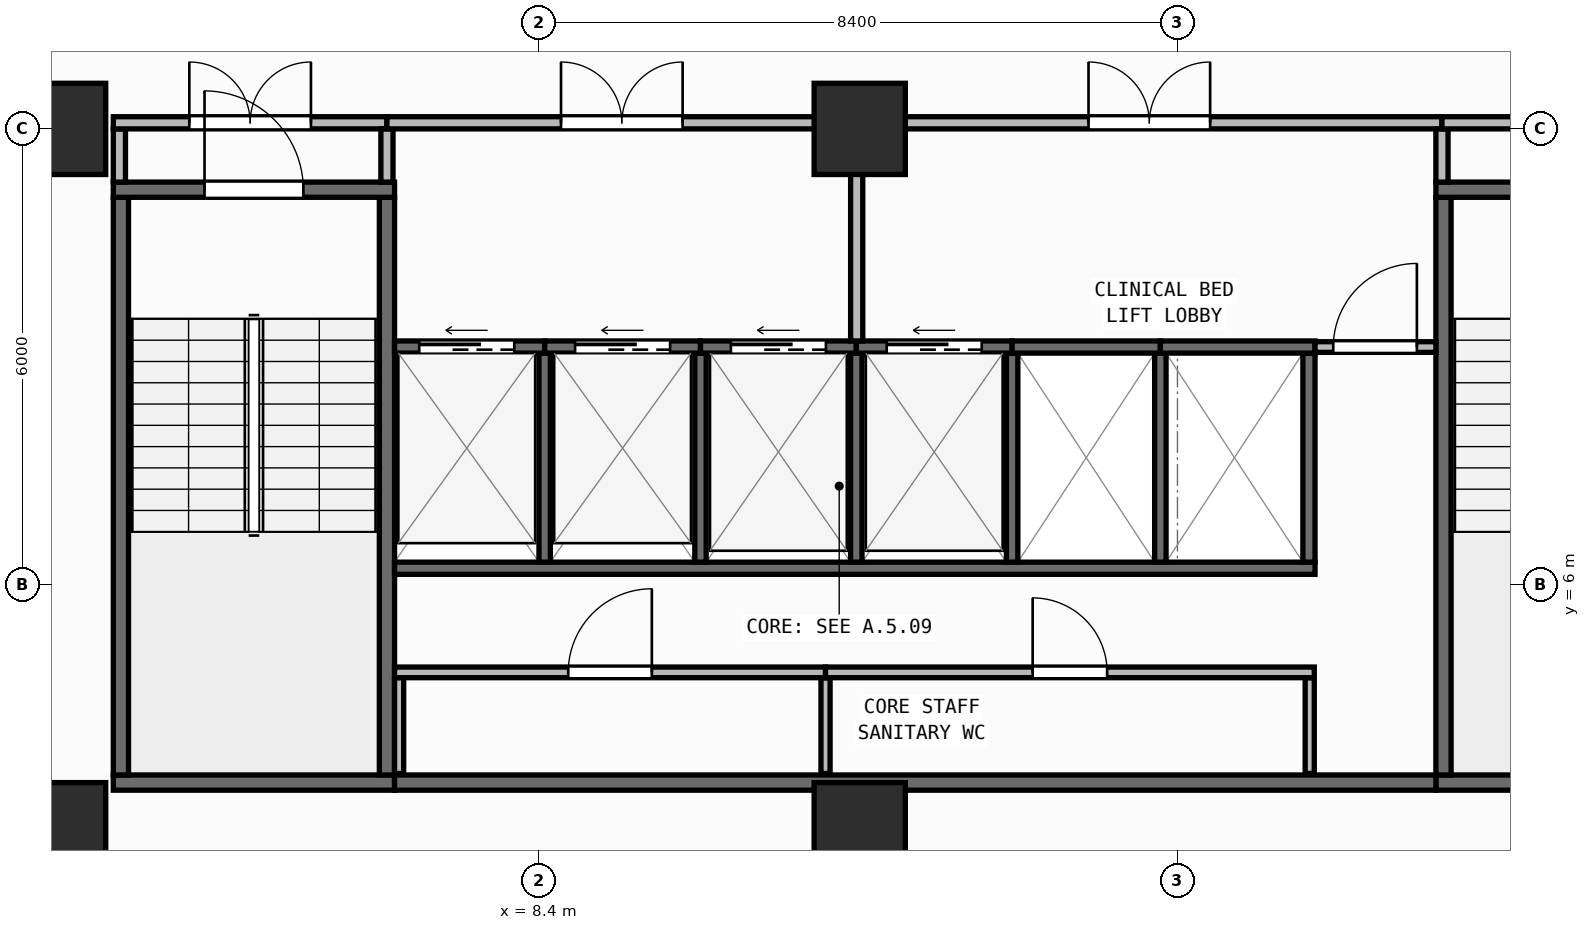
"""IFC4 building model, lengths in metres.
Left out: names, types, materials, properties, quantities, classifications, styles, units other than length and angle.
Written with IfcOpenShell. Run it as: python <this file> out.ifc"""

import sys

from ifc_helpers import new_model, si_unit, direction, frame, frame_2d, origin, origin_2d, place, context, subcontext, project, spatial, rectangle, extrude, element, fill, save


model = new_model("IFC4")
c1 = context("Model", 3, precision=1e-05, world=origin(), true_north=direction((0.0, 1.0)))
c2 = subcontext(c1, "Body", "Model", "MODEL_VIEW")
j1 = project(units=[si_unit("LENGTHUNIT", "METRE"), si_unit("PLANEANGLEUNIT", "RADIAN")], contexts=[c1])
p1 = place(None, origin())
s1 = spatial("IfcSite", under=j1, at=p1, CompositionType="ELEMENT")
p2 = place(p1, origin())
s2 = spatial("IfcBuilding", under=s1, at=p2, CompositionType="ELEMENT")
p3 = place(p2, frame((0.0, 0.0, 119.15)))
s3 = spatial("IfcBuildingStorey", under=s2, at=p3, CompositionType="ELEMENT", Elevation=119.15)
for number, where, z_axis, x_axis in (
    (1, (2.1, 2.8, 0.0), (0.0, 0.0, 1.0), (1.0, 0.0, 0.0)),
    (2, (12.62, 2.8, 0.0), (0.0, 0.0, 1.0), (1.0, 0.0, 0.0)),
    (3, (2.1, 12.0, 0.0), (0.0, 0.0, 1.0), (1.0, 0.0, 0.0)),
    (4, (12.62, 12.0, 0.0), (0.0, 0.0, 1.0), (1.0, 0.0, 0.0)),
):
    element("IfcColumn", number, at=place(p3, frame(where, z_axis=z_axis, x_axis=x_axis)), inside=s3, PredefinedType="COLUMN", context=c2, shape_type="SweptSolid", body=[
        extrude(rectangle(XDim=1.2, YDim=1.2, at=origin_2d()), origin(), (0.0, 0.0, 1.0), 3.95),
    ])
p4 = place(p3, frame((2.76, 0.173, 0.0), z_axis=(0.0, 0.0, 1.0), x_axis=(0.996857931723, 0.079210251617, 0.0)))
e5 = element("IfcWall", 5, at=p4, inside=s3, PredefinedType="STANDARD", context=c2, shape_type="SweptSolid", body=[
    extrude(rectangle(XDim=51.442, YDim=0.26, at=frame_2d((25.721, 0.0))), origin(), (0.0, 0.0, 1.0), 3.71),
])
p5 = place(p4, frame((24.521, 0.0, 0.9)))
e6 = element("IfcOpeningElement", 6, at=p5, cuts=e5, PredefinedType="OPENING", context=c2, shape_type="SweptSolid", body=[
    extrude(rectangle(XDim=2.4, YDim=1.65, at=frame_2d((1.2, 0.825))), frame((0.0, 0.14, 0.0), z_axis=(0.0, -1.0, 0.0), x_axis=(1.0, 0.0, 0.0)), (0.0, 0.0, 1.0), 0.28),
])
p6 = place(p3, frame((2.8, 3.4, 0.0), z_axis=(0.0, 0.0, 1.0), x_axis=(1.0, 0.0, 0.0)))
e7 = element("IfcWall", 7, at=p6, inside=s3, PredefinedType="SHEAR", context=c2, shape_type="SweptSolid", body=[
    extrude(rectangle(XDim=3.7, YDim=0.2, at=frame_2d((1.85, 0.0))), origin(), (0.0, 0.0, 1.0), 3.71),
])
for number, where, z_axis, x_axis in (
    (8, (2.9, 3.5, 0.0), (0.0, 0.0, 1.0), (0.0, 1.0, 0.0)),
    (9, (6.4, 3.5, 0.0), (0.0, 0.0, 1.0), (0.0, 1.0, 0.0)),
):
    element("IfcWall", number, at=place(p3, frame(where, z_axis=z_axis, x_axis=x_axis)), inside=s3, PredefinedType="SHEAR", context=c2, shape_type="SweptSolid", body=[
        extrude(rectangle(XDim=7.6, YDim=0.2, at=frame_2d((3.8, 0.0))), origin(), (0.0, 0.0, 1.0), 3.71),
    ])
p7 = place(p3, frame((2.8, 11.2, 0.0), z_axis=(0.0, 0.0, 1.0), x_axis=(1.0, 0.0, 0.0)))
e10 = element("IfcWall", 10, at=p7, inside=s3, PredefinedType="SHEAR", context=c2, shape_type="SweptSolid", body=[
    extrude(rectangle(XDim=3.7, YDim=0.2, at=frame_2d((1.85, 0.0))), origin(), (0.0, 0.0, 1.0), 3.71),
])
p8 = place(p7, frame((1.2, 0.0, 0.0)))
e11 = element("IfcOpeningElement", 11, at=p8, cuts=e10, PredefinedType="OPENING", context=c2, shape_type="SweptSolid", body=[
    extrude(rectangle(XDim=1.3, YDim=2.15, at=frame_2d((0.65, 1.075))), frame((0.0, 0.11, 0.0), z_axis=(0.0, -1.0, 0.0), x_axis=(1.0, 0.0, 0.0)), (0.0, 0.0, 1.0), 0.22),
])
p9 = place(p3, frame((20.2, 3.4, 0.0), z_axis=(0.0, 0.0, 1.0), x_axis=(1.0, 0.0, 0.0)))
e12 = element("IfcWall", 12, at=p9, inside=s3, PredefinedType="SHEAR", context=c2, shape_type="SweptSolid", body=[
    extrude(rectangle(XDim=3.7, YDim=0.2, at=frame_2d((1.85, 0.0))), origin(), (0.0, 0.0, 1.0), 3.71),
])
p10 = place(p3, frame((20.3, 3.5, 0.0), z_axis=(0.0, 0.0, 1.0), x_axis=(0.0, 1.0, 0.0)))
e13 = element("IfcWall", 13, at=p10, inside=s3, PredefinedType="SHEAR", context=c2, shape_type="SweptSolid", body=[
    extrude(rectangle(XDim=7.6, YDim=0.2, at=frame_2d((3.8, 0.0))), origin(), (0.0, 0.0, 1.0), 3.71),
])
p11 = place(p3, frame((20.2, 11.2, 0.0), z_axis=(0.0, 0.0, 1.0), x_axis=(1.0, 0.0, 0.0)))
e14 = element("IfcWall", 14, at=p11, inside=s3, PredefinedType="SHEAR", context=c2, shape_type="SweptSolid", body=[
    extrude(rectangle(XDim=3.7, YDim=0.2, at=frame_2d((1.85, 0.0))), origin(), (0.0, 0.0, 1.0), 3.71),
])
p12 = place(p11, frame((1.2, 0.0, 0.0)))
e15 = element("IfcOpeningElement", 15, at=p12, cuts=e14, PredefinedType="OPENING", context=c2, shape_type="SweptSolid", body=[
    extrude(rectangle(XDim=1.3, YDim=2.15, at=frame_2d((0.65, 1.075))), frame((0.0, 0.11, 0.0), z_axis=(0.0, -1.0, 0.0), x_axis=(1.0, 0.0, 0.0)), (0.0, 0.0, 1.0), 0.22),
])
p13 = place(p3, frame((6.5, 3.4, 0.0), z_axis=(0.0, 0.0, 1.0), x_axis=(1.0, 0.0, 0.0)))
e16 = element("IfcWall", 16, at=p13, inside=s3, PredefinedType="SHEAR", context=c2, shape_type="SweptSolid", body=[
    extrude(rectangle(XDim=13.7, YDim=0.2, at=frame_2d((6.85, 0.0))), origin(), (0.0, 0.0, 1.0), 3.71),
])
p14 = place(p3, frame((6.5, 6.22, 0.0), z_axis=(0.0, 0.0, 1.0), x_axis=(1.0, 0.0, 0.0)))
e17 = element("IfcWall", 17, at=p14, inside=s3, PredefinedType="SHEAR", context=c2, shape_type="SweptSolid", body=[
    extrude(rectangle(XDim=12.11, YDim=0.16, at=frame_2d((6.055, 0.0))), origin(), (0.0, 0.0, 1.0), 3.71),
])
p15 = place(p3, frame((18.53, 6.3, 0.0), z_axis=(0.0, 0.0, 1.0), x_axis=(0.0, 1.0, 0.0)))
e18 = element("IfcWall", 18, at=p15, inside=s3, PredefinedType="SHEAR", context=c2, shape_type="SweptSolid", body=[
    extrude(rectangle(XDim=2.75, YDim=0.16, at=frame_2d((1.375, 0.0))), origin(), (0.0, 0.0, 1.0), 3.71),
])
for number, where, z_axis, x_axis in (
    (19, (8.475, 6.3, 0.0), (0.0, 0.0, 1.0), (0.0, 1.0, 0.0)),
    (20, (10.525, 6.3, 0.0), (0.0, 0.0, 1.0), (0.0, 1.0, 0.0)),
    (21, (12.575, 6.3, 0.0), (0.0, 0.0, 1.0), (0.0, 1.0, 0.0)),
    (22, (14.625, 6.3, 0.0), (0.0, 0.0, 1.0), (0.0, 1.0, 0.0)),
    (23, (16.575, 6.3, 0.0), (0.0, 0.0, 1.0), (0.0, 1.0, 0.0)),
):
    element("IfcWall", number, at=place(p3, frame(where, z_axis=z_axis, x_axis=x_axis)), inside=s3, PredefinedType="SHEAR", context=c2, shape_type="SweptSolid", body=[
        extrude(rectangle(XDim=2.75, YDim=0.15, at=frame_2d((1.375, 0.0))), origin(), (0.0, 0.0, 1.0), 3.71),
    ])
p16 = place(p3, frame((6.5, 9.13, 0.0), z_axis=(0.0, 0.0, 1.0), x_axis=(1.0, 0.0, 0.0)))
e24 = element("IfcWall", 24, at=p16, inside=s3, PredefinedType="SHEAR", context=c2, shape_type="SweptSolid", body=[
    extrude(rectangle(XDim=1.975, YDim=0.16, at=frame_2d((0.988, 0.0))), origin(), (0.0, 0.0, 1.0), 3.71),
])
p17 = place(p16, frame((0.325, 0.0, 0.0)))
e25 = element("IfcOpeningElement", 25, at=p17, cuts=e24, PredefinedType="OPENING", context=c2, shape_type="SweptSolid", body=[
    extrude(rectangle(XDim=1.25, YDim=2.15, at=frame_2d((0.625, 1.075))), frame((0.0, 0.09, 0.0), z_axis=(0.0, -1.0, 0.0), x_axis=(1.0, 0.0, 0.0)), (0.0, 0.0, 1.0), 0.18),
])
p18 = place(p3, frame((8.475, 9.13, 0.0), z_axis=(0.0, 0.0, 1.0), x_axis=(1.0, 0.0, 0.0)))
e26 = element("IfcWall", 26, at=p18, inside=s3, PredefinedType="SHEAR", context=c2, shape_type="SweptSolid", body=[
    extrude(rectangle(XDim=2.05, YDim=0.16, at=frame_2d((1.025, 0.0))), origin(), (0.0, 0.0, 1.0), 3.71),
])
p19 = place(p18, frame((0.4, 0.0, 0.0)))
e27 = element("IfcOpeningElement", 27, at=p19, cuts=e26, PredefinedType="OPENING", context=c2, shape_type="SweptSolid", body=[
    extrude(rectangle(XDim=1.25, YDim=2.15, at=frame_2d((0.625, 1.075))), frame((0.0, 0.09, 0.0), z_axis=(0.0, -1.0, 0.0), x_axis=(1.0, 0.0, 0.0)), (0.0, 0.0, 1.0), 0.18),
])
p20 = place(p3, frame((10.525, 9.13, 0.0), z_axis=(0.0, 0.0, 1.0), x_axis=(1.0, 0.0, 0.0)))
e28 = element("IfcWall", 28, at=p20, inside=s3, PredefinedType="SHEAR", context=c2, shape_type="SweptSolid", body=[
    extrude(rectangle(XDim=2.05, YDim=0.16, at=frame_2d((1.025, 0.0))), origin(), (0.0, 0.0, 1.0), 3.71),
])
p21 = place(p20, frame((0.4, 0.0, 0.0)))
e29 = element("IfcOpeningElement", 29, at=p21, cuts=e28, PredefinedType="OPENING", context=c2, shape_type="SweptSolid", body=[
    extrude(rectangle(XDim=1.25, YDim=2.15, at=frame_2d((0.625, 1.075))), frame((0.0, 0.09, 0.0), z_axis=(0.0, -1.0, 0.0), x_axis=(1.0, 0.0, 0.0)), (0.0, 0.0, 1.0), 0.18),
])
p22 = place(p3, frame((12.575, 9.13, 0.0), z_axis=(0.0, 0.0, 1.0), x_axis=(1.0, 0.0, 0.0)))
e30 = element("IfcWall", 30, at=p22, inside=s3, PredefinedType="SHEAR", context=c2, shape_type="SweptSolid", body=[
    extrude(rectangle(XDim=2.05, YDim=0.16, at=frame_2d((1.025, 0.0))), origin(), (0.0, 0.0, 1.0), 3.71),
])
p23 = place(p22, frame((0.4, 0.0, 0.0)))
e31 = element("IfcOpeningElement", 31, at=p23, cuts=e30, PredefinedType="OPENING", context=c2, shape_type="SweptSolid", body=[
    extrude(rectangle(XDim=1.25, YDim=2.15, at=frame_2d((0.625, 1.075))), frame((0.0, 0.09, 0.0), z_axis=(0.0, -1.0, 0.0), x_axis=(1.0, 0.0, 0.0)), (0.0, 0.0, 1.0), 0.18),
])
p24 = place(p3, frame((14.625, 9.13, 0.0), z_axis=(0.0, 0.0, 1.0), x_axis=(1.0, 0.0, 0.0)))
e32 = element("IfcWall", 32, at=p24, inside=s3, PredefinedType="SHEAR", context=c2, shape_type="SweptSolid", body=[
    extrude(rectangle(XDim=1.95, YDim=0.16, at=frame_2d((0.975, 0.0))), origin(), (0.0, 0.0, 1.0), 3.71),
])
p25 = place(p3, frame((16.575, 9.13, 0.0), z_axis=(0.0, 0.0, 1.0), x_axis=(1.0, 0.0, 0.0)))
e33 = element("IfcWall", 33, at=p25, inside=s3, PredefinedType="SHEAR", context=c2, shape_type="SweptSolid", body=[
    extrude(rectangle(XDim=2.035, YDim=0.16, at=frame_2d((1.018, 0.0))), origin(), (0.0, 0.0, 1.0), 3.71),
])
for number, where, z_axis, x_axis in (
    (34, (6.56, 3.52, 0.0), (0.0, 0.0, 1.0), (0.0, 1.0, 0.0)),
    (35, (12.17, 3.52, 0.0), (0.0, 0.0, 1.0), (0.0, 1.0, 0.0)),
    (36, (18.54, 3.52, 0.0), (0.0, 0.0, 1.0), (0.0, 1.0, 0.0)),
):
    element("IfcWall", number, at=place(p3, frame(where, z_axis=z_axis, x_axis=x_axis)), inside=s3, PredefinedType="PARTITIONING", context=c2, shape_type="SweptSolid", body=[
        extrude(rectangle(XDim=1.26, YDim=0.12, at=frame_2d((0.63, 0.0))), origin(), (0.0, 0.0, 1.0), 3.71),
    ])
p26 = place(p3, frame((6.5, 4.85, 0.0), z_axis=(0.0, 0.0, 1.0), x_axis=(1.0, 0.0, 0.0)))
e37 = element("IfcWall", 37, at=p26, inside=s3, PredefinedType="PARTITIONING", context=c2, shape_type="SweptSolid", body=[
    extrude(rectangle(XDim=5.67, YDim=0.14, at=frame_2d((2.835, 0.0))), origin(), (0.0, 0.0, 1.0), 3.71),
])
p27 = place(p26, frame((2.285, 0.0, 0.0)))
e38 = element("IfcOpeningElement", 38, at=p27, cuts=e37, PredefinedType="OPENING", context=c2, shape_type="SweptSolid", body=[
    extrude(rectangle(XDim=1.1, YDim=2.1, at=frame_2d((0.55, 1.05))), frame((0.0, 0.08, 0.0), z_axis=(0.0, -1.0, 0.0), x_axis=(1.0, 0.0, 0.0)), (0.0, 0.0, 1.0), 0.16),
])
p28 = place(p3, frame((12.17, 4.85, 0.0), z_axis=(0.0, 0.0, 1.0), x_axis=(1.0, 0.0, 0.0)))
e39 = element("IfcWall", 39, at=p28, inside=s3, PredefinedType="PARTITIONING", context=c2, shape_type="SweptSolid", body=[
    extrude(rectangle(XDim=6.43, YDim=0.14, at=frame_2d((3.215, 0.0))), origin(), (0.0, 0.0, 1.0), 3.71),
])
p29 = place(p28, frame((2.725, 0.0, 0.0)))
e40 = element("IfcOpeningElement", 40, at=p29, cuts=e39, PredefinedType="OPENING", context=c2, shape_type="SweptSolid", body=[
    extrude(rectangle(XDim=0.98, YDim=2.1, at=frame_2d((0.49, 1.05))), frame((0.0, 0.08, 0.0), z_axis=(0.0, -1.0, 0.0), x_axis=(1.0, 0.0, 0.0)), (0.0, 0.0, 1.0), 0.16),
])
p30 = place(p3, frame((18.61, 9.13, 0.0), z_axis=(0.0, 0.0, 1.0), x_axis=(1.0, 0.0, 0.0)))
e41 = element("IfcWall", 41, at=p30, inside=s3, PredefinedType="PARTITIONING", context=c2, shape_type="SweptSolid", body=[
    extrude(rectangle(XDim=1.59, YDim=0.14, at=frame_2d((0.795, 0.0))), origin(), (0.0, 0.0, 1.0), 3.71),
])
p31 = place(p30, frame((0.24, 0.0, 0.0)))
e42 = element("IfcOpeningElement", 42, at=p31, cuts=e41, PredefinedType="OPENING", context=c2, shape_type="SweptSolid", body=[
    extrude(rectangle(XDim=1.1, YDim=2.1, at=frame_2d((0.55, 1.05))), frame((0.0, 0.08, 0.0), z_axis=(0.0, -1.0, 0.0), x_axis=(1.0, 0.0, 0.0)), (0.0, 0.0, 1.0), 0.16),
])
p32 = place(p3, frame((2.88, 11.3, 0.0), z_axis=(0.0, 0.0, 1.0), x_axis=(0.0, 1.0, 0.0)))
e43 = element("IfcWall", 43, at=p32, inside=s3, PredefinedType="PARTITIONING", context=c2, shape_type="SweptSolid", body=[
    extrude(rectangle(XDim=0.7, YDim=0.16, at=frame_2d((0.35, 0.0))), origin(), (0.0, 0.0, 1.0), 3.71),
])
p33 = place(p3, frame((2.8, 12.08, 0.0), z_axis=(0.0, 0.0, 1.0), x_axis=(1.0, 0.0, 0.0)))
e44 = element("IfcWall", 44, at=p33, inside=s3, PredefinedType="PARTITIONING", context=c2, shape_type="SweptSolid", body=[
    extrude(rectangle(XDim=3.6, YDim=0.16, at=frame_2d((1.8, 0.0))), origin(), (0.0, 0.0, 1.0), 3.083),
])
p34 = place(p33, frame((1.0, 0.0, 0.0)))
e45 = element("IfcOpeningElement", 45, at=p34, cuts=e44, PredefinedType="OPENING", context=c2, shape_type="SweptSolid", body=[
    extrude(rectangle(XDim=1.6, YDim=2.05, at=frame_2d((0.8, 1.025))), frame((0.0, 0.09, 0.0), z_axis=(0.0, -1.0, 0.0), x_axis=(1.0, 0.0, 0.0)), (0.0, 0.0, 1.0), 0.18),
])
p35 = place(p3, frame((6.4, 11.3, 0.0), z_axis=(0.0, 0.0, 1.0), x_axis=(0.0, 1.0, 0.0)))
e46 = element("IfcWall", 46, at=p35, inside=s3, PredefinedType="PARTITIONING", context=c2, shape_type="SweptSolid", body=[
    extrude(rectangle(XDim=0.7, YDim=0.16, at=frame_2d((0.35, 0.0))), origin(), (0.0, 0.0, 1.0), 3.71),
])
p36 = place(p3, frame((6.4, 12.08, 0.0), z_axis=(0.0, 0.0, 1.0), x_axis=(1.0, 0.0, 0.0)))
e47 = element("IfcWall", 47, at=p36, inside=s3, PredefinedType="PARTITIONING", context=c2, shape_type="SweptSolid", body=[
    extrude(rectangle(XDim=6.18, YDim=0.16, at=frame_2d((3.09, 0.0))), origin(), (0.0, 0.0, 1.0), 3.083),
])
p37 = place(p36, frame((2.29, 0.0, 0.0)))
e48 = element("IfcOpeningElement", 48, at=p37, cuts=e47, PredefinedType="OPENING", context=c2, shape_type="SweptSolid", body=[
    extrude(rectangle(XDim=1.6, YDim=2.05, at=frame_2d((0.8, 1.025))), frame((0.0, 0.09, 0.0), z_axis=(0.0, -1.0, 0.0), x_axis=(1.0, 0.0, 0.0)), (0.0, 0.0, 1.0), 0.18),
])
p38 = place(p3, frame((12.58, 9.21, 0.0), z_axis=(0.0, 0.0, 1.0), x_axis=(0.0, 1.0, 0.0)))
e49 = element("IfcWall", 49, at=p38, inside=s3, PredefinedType="PARTITIONING", context=c2, shape_type="SweptSolid", body=[
    extrude(rectangle(XDim=2.79, YDim=0.16, at=frame_2d((1.395, 0.0))), origin(), (0.0, 0.0, 1.0), 3.71),
])
p39 = place(p3, frame((12.58, 12.08, 0.0), z_axis=(0.0, 0.0, 1.0), x_axis=(1.0, 0.0, 0.0)))
e50 = element("IfcWall", 50, at=p39, inside=s3, PredefinedType="PARTITIONING", context=c2, shape_type="SweptSolid", body=[
    extrude(rectangle(XDim=7.7, YDim=0.16, at=frame_2d((3.85, 0.0))), origin(), (0.0, 0.0, 1.0), 3.083),
])
p40 = place(p39, frame((3.05, 0.0, 0.0)))
e51 = element("IfcOpeningElement", 51, at=p40, cuts=e50, PredefinedType="OPENING", context=c2, shape_type="SweptSolid", body=[
    extrude(rectangle(XDim=1.6, YDim=2.05, at=frame_2d((0.8, 1.025))), frame((0.0, 0.09, 0.0), z_axis=(0.0, -1.0, 0.0), x_axis=(1.0, 0.0, 0.0)), (0.0, 0.0, 1.0), 0.18),
])
p41 = place(p3, frame((20.28, 11.3, 0.0), z_axis=(0.0, 0.0, 1.0), x_axis=(0.0, 1.0, 0.0)))
e52 = element("IfcWall", 52, at=p41, inside=s3, PredefinedType="PARTITIONING", context=c2, shape_type="SweptSolid", body=[
    extrude(rectangle(XDim=0.7, YDim=0.16, at=frame_2d((0.35, 0.0))), origin(), (0.0, 0.0, 1.0), 3.71),
])
p42 = place(p3, frame((20.28, 12.08, 0.0), z_axis=(0.0, 0.0, 1.0), x_axis=(1.0, 0.0, 0.0)))
e53 = element("IfcWall", 53, at=p42, inside=s3, PredefinedType="PARTITIONING", context=c2, shape_type="SweptSolid", body=[
    extrude(rectangle(XDim=3.62, YDim=0.16, at=frame_2d((1.81, 0.0))), origin(), (0.0, 0.0, 1.0), 3.083),
])
p43 = place(p42, frame((1.01, 0.0, 0.0)))
e54 = element("IfcOpeningElement", 54, at=p43, cuts=e53, PredefinedType="OPENING", context=c2, shape_type="SweptSolid", body=[
    extrude(rectangle(XDim=1.6, YDim=2.05, at=frame_2d((0.8, 1.025))), frame((0.0, 0.09, 0.0), z_axis=(0.0, -1.0, 0.0), x_axis=(1.0, 0.0, 0.0)), (0.0, 0.0, 1.0), 0.18),
])
p44 = place(p8, origin())
e55 = element("IfcDoor", 55, at=p44, inside=s3, OperationType="SINGLE_SWING_LEFT", PredefinedType="DOOR", context=c2, shape_type="SweptSolid", body=[
    extrude(rectangle(XDim=1.3, YDim=2.15, at=frame_2d((0.65, 1.075))), frame((0.0, 0.025, 0.0), z_axis=(0.0, -1.0, 0.0), x_axis=(1.0, 0.0, 0.0)), (0.0, 0.0, 1.0), 0.05),
])
fill(e11, e55)
p45 = place(p17, origin())
e56 = element("IfcDoor", 56, at=p45, inside=s3, OperationType="SLIDING_TO_LEFT", PredefinedType="DOOR", context=c2, shape_type="SweptSolid", body=[
    extrude(rectangle(XDim=1.25, YDim=2.15, at=frame_2d((0.625, 1.075))), frame((0.0, 0.025, 0.0), z_axis=(0.0, -1.0, 0.0), x_axis=(1.0, 0.0, 0.0)), (0.0, 0.0, 1.0), 0.05),
])
fill(e25, e56)
p46 = place(p19, origin())
e57 = element("IfcDoor", 57, at=p46, inside=s3, OperationType="SLIDING_TO_LEFT", PredefinedType="DOOR", context=c2, shape_type="SweptSolid", body=[
    extrude(rectangle(XDim=1.25, YDim=2.15, at=frame_2d((0.625, 1.075))), frame((0.0, 0.025, 0.0), z_axis=(0.0, -1.0, 0.0), x_axis=(1.0, 0.0, 0.0)), (0.0, 0.0, 1.0), 0.05),
])
fill(e27, e57)
p47 = place(p21, origin())
e58 = element("IfcDoor", 58, at=p47, inside=s3, OperationType="SLIDING_TO_LEFT", PredefinedType="DOOR", context=c2, shape_type="SweptSolid", body=[
    extrude(rectangle(XDim=1.25, YDim=2.15, at=frame_2d((0.625, 1.075))), frame((0.0, 0.025, 0.0), z_axis=(0.0, -1.0, 0.0), x_axis=(1.0, 0.0, 0.0)), (0.0, 0.0, 1.0), 0.05),
])
fill(e29, e58)
p48 = place(p23, origin())
e59 = element("IfcDoor", 59, at=p48, inside=s3, OperationType="SLIDING_TO_LEFT", PredefinedType="DOOR", context=c2, shape_type="SweptSolid", body=[
    extrude(rectangle(XDim=1.25, YDim=2.15, at=frame_2d((0.625, 1.075))), frame((0.0, 0.025, 0.0), z_axis=(0.0, -1.0, 0.0), x_axis=(1.0, 0.0, 0.0)), (0.0, 0.0, 1.0), 0.05),
])
fill(e31, e59)
p49 = place(p27, origin())
e60 = element("IfcDoor", 60, at=p49, inside=s3, OperationType="SINGLE_SWING_RIGHT", PredefinedType="DOOR", context=c2, shape_type="SweptSolid", body=[
    extrude(rectangle(XDim=1.1, YDim=2.1, at=frame_2d((0.55, 1.05))), frame((0.0, 0.025, 0.0), z_axis=(0.0, -1.0, 0.0), x_axis=(1.0, 0.0, 0.0)), (0.0, 0.0, 1.0), 0.05),
])
fill(e38, e60)
p50 = place(p29, origin())
e61 = element("IfcDoor", 61, at=p50, inside=s3, OperationType="SINGLE_SWING_LEFT", PredefinedType="DOOR", context=c2, shape_type="SweptSolid", body=[
    extrude(rectangle(XDim=0.98, YDim=2.1, at=frame_2d((0.49, 1.05))), frame((0.0, 0.025, 0.0), z_axis=(0.0, -1.0, 0.0), x_axis=(1.0, 0.0, 0.0)), (0.0, 0.0, 1.0), 0.05),
])
fill(e40, e61)
p51 = place(p31, origin())
e62 = element("IfcDoor", 62, at=p51, inside=s3, OperationType="SINGLE_SWING_RIGHT", PredefinedType="DOOR", context=c2, shape_type="SweptSolid", body=[
    extrude(rectangle(XDim=1.1, YDim=2.1, at=frame_2d((0.55, 1.05))), frame((0.0, 0.025, 0.0), z_axis=(0.0, -1.0, 0.0), x_axis=(1.0, 0.0, 0.0)), (0.0, 0.0, 1.0), 0.05),
])
fill(e42, e62)
p52 = place(p34, origin())
e63 = element("IfcDoor", 63, at=p52, inside=s3, OperationType="DOUBLE_DOOR_SINGLE_SWING", PredefinedType="DOOR", context=c2, shape_type="SweptSolid", body=[
    extrude(rectangle(XDim=1.6, YDim=2.05, at=frame_2d((0.8, 1.025))), frame((0.0, 0.025, 0.0), z_axis=(0.0, -1.0, 0.0), x_axis=(1.0, 0.0, 0.0)), (0.0, 0.0, 1.0), 0.05),
])
fill(e45, e63)
p53 = place(p37, origin())
e64 = element("IfcDoor", 64, at=p53, inside=s3, OperationType="DOUBLE_DOOR_SINGLE_SWING", PredefinedType="DOOR", context=c2, shape_type="SweptSolid", body=[
    extrude(rectangle(XDim=1.6, YDim=2.05, at=frame_2d((0.8, 1.025))), frame((0.0, 0.025, 0.0), z_axis=(0.0, -1.0, 0.0), x_axis=(1.0, 0.0, 0.0)), (0.0, 0.0, 1.0), 0.05),
])
fill(e48, e64)
p54 = place(p40, origin())
e65 = element("IfcDoor", 65, at=p54, inside=s3, OperationType="DOUBLE_DOOR_SINGLE_SWING", PredefinedType="DOOR", context=c2, shape_type="SweptSolid", body=[
    extrude(rectangle(XDim=1.6, YDim=2.05, at=frame_2d((0.8, 1.025))), frame((0.0, 0.025, 0.0), z_axis=(0.0, -1.0, 0.0), x_axis=(1.0, 0.0, 0.0)), (0.0, 0.0, 1.0), 0.05),
])
fill(e51, e65)
save(model, sys.argv[1])
